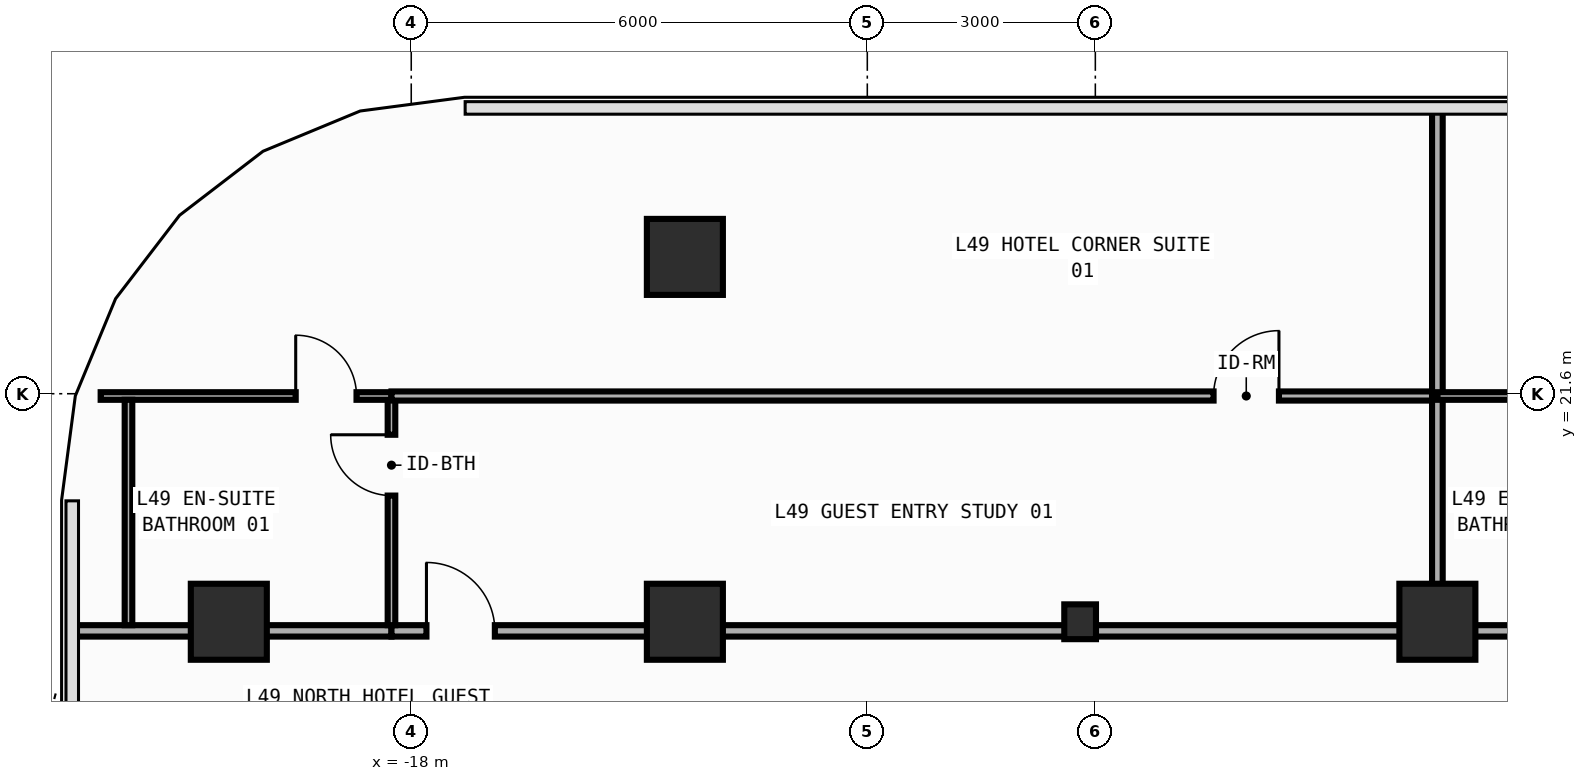
"""IFC4 building model, lengths in metres.
Left out: names, types, materials, properties, quantities, classifications, styles, units other than length and angle.
Written with IfcOpenShell. Run it as: python <this file> out.ifc"""

import sys

from ifc_helpers import new_model, si_unit, direction, frame, frame_2d, origin, origin_2d, place, context, subcontext, project, spatial, rectangle, i_section, extrude, element, fill, save


model = new_model("IFC4")
c1 = context("Model", 3, precision=1e-05, world=origin(), true_north=direction((0.0, 1.0)))
c2 = subcontext(c1, "Body", "Model", "MODEL_VIEW")
j1 = project(units=[si_unit("LENGTHUNIT", "METRE"), si_unit("PLANEANGLEUNIT", "RADIAN")], contexts=[c1])
p1 = place(None, origin())
s1 = spatial("IfcSite", under=j1, at=p1, CompositionType="ELEMENT")
p2 = place(p1, origin())
s2 = spatial("IfcBuilding", under=s1, at=p2, CompositionType="ELEMENT")
p3 = place(p2, frame((0.0, 0.0, 210.6)))
s3 = spatial("IfcBuildingStorey", under=s2, at=p3, CompositionType="ELEMENT", Elevation=210.6)
p4 = place(p3, frame((-9.2, 18.6, 0.0), z_axis=(0.0, 0.0, 1.0), x_axis=(1.0, 0.0, 0.0)))
e1 = element("IfcColumn", 1, at=p4, inside=s3, PredefinedType="COLUMN", context=c2, shape_type="SweptSolid", body=[
    extrude(i_section(OverallWidth=0.417, OverallDepth=0.458, WebThickness=0.03, FlangeThickness=0.05, FilletRadius=0.022, at=origin_2d()), origin(), (0.0, 0.0, 1.0), 3.8),
])
for number, where, z_axis, x_axis in (
    (2, (-20.4, 18.6, 0.0), (0.0, 0.0, 1.0), (1.0, 0.0, 0.0)),
    (3, (-14.4, 18.6, 0.0), (0.0, 0.0, 1.0), (1.0, 0.0, 0.0)),
    (4, (-4.5, 18.6, 0.0), (0.0, 0.0, 1.0), (1.0, 0.0, 0.0)),
    (5, (-14.4, 23.4, 0.0), (0.0, 0.0, 1.0), (1.0, 0.0, 0.0)),
):
    element("IfcColumn", number, at=place(p3, frame(where, z_axis=z_axis, x_axis=x_axis)), inside=s3, PredefinedType="COLUMN", context=c2, shape_type="SweptSolid", body=[
        extrude(rectangle(XDim=1.0, YDim=1.0, at=origin_2d()), origin(), (0.0, 0.0, 1.0), 3.8),
    ])
p5 = place(p3, frame((-22.455, 18.48, 0.0), z_axis=(0.0, 0.0, 1.0), x_axis=(1.0, 0.0, 0.0)))
e6 = element("IfcWall", 6, at=p5, inside=s3, PredefinedType="PARTITIONING", context=c2, shape_type="SweptSolid", body=[
    extrude(rectangle(XDim=4.195, YDim=0.15, at=frame_2d((2.098, 0.0))), origin(), (0.0, 0.0, 1.0), 2.862),
])
p6 = place(p3, frame((-18.26, 18.48, 0.0), z_axis=(0.0, 0.0, 1.0), x_axis=(1.0, 0.0, 0.0)))
e7 = element("IfcWall", 7, at=p6, inside=s3, PredefinedType="PARTITIONING", context=c2, shape_type="SweptSolid", body=[
    extrude(rectangle(XDim=13.76, YDim=0.15, at=frame_2d((6.88, 0.0))), origin(), (0.0, 0.0, 1.0), 2.862),
])
p7 = place(p6, frame((0.46, 0.0, 0.0)))
e8 = element("IfcOpeningElement", 8, at=p7, cuts=e7, PredefinedType="OPENING", context=c2, shape_type="SweptSolid", body=[
    extrude(rectangle(XDim=0.9, YDim=2.15, at=frame_2d((0.45, 1.075))), frame((0.0, 0.085, 0.0), z_axis=(0.0, -1.0, 0.0), x_axis=(1.0, 0.0, 0.0)), (0.0, 0.0, 1.0), 0.17),
])
p8 = place(p3, frame((-4.5, 18.48, 0.0), z_axis=(0.0, 0.0, 1.0), x_axis=(1.0, 0.0, 0.0)))
e9 = element("IfcWall", 9, at=p8, inside=s3, PredefinedType="PARTITIONING", context=c2, shape_type="SweptSolid", body=[
    extrude(rectangle(XDim=3.54, YDim=0.15, at=frame_2d((1.77, 0.0))), origin(), (0.0, 0.0, 1.0), 2.862),
])
p9 = place(p3, frame((-18.26, 18.555, 0.0), z_axis=(0.0, 0.0, 1.0), x_axis=(0.0, 1.0, 0.0)))
e10 = element("IfcWall", 10, at=p9, inside=s3, PredefinedType="PARTITIONING", context=c2, shape_type="SweptSolid", body=[
    extrude(rectangle(XDim=2.965, YDim=0.1, at=frame_2d((1.482, 0.0))), origin(), (0.0, 0.0, 1.0), 3.45),
])
p10 = place(p9, frame((1.705, 0.0, 0.0)))
e11 = element("IfcOpeningElement", 11, at=p10, cuts=e10, PredefinedType="OPENING", context=c2, shape_type="SweptSolid", body=[
    extrude(rectangle(XDim=0.8, YDim=2.1, at=frame_2d((0.4, 1.05))), frame((0.0, 0.06, 0.0), z_axis=(0.0, -1.0, 0.0), x_axis=(1.0, 0.0, 0.0)), (0.0, 0.0, 1.0), 0.12),
])
p11 = place(p3, frame((-22.086, 21.57, 0.0), z_axis=(0.0, 0.0, 1.0), x_axis=(1.0, 0.0, 0.0)))
e12 = element("IfcWall", 12, at=p11, inside=s3, PredefinedType="PARTITIONING", context=c2, shape_type="SweptSolid", body=[
    extrude(rectangle(XDim=3.826, YDim=0.1, at=frame_2d((1.913, 0.0))), origin(), (0.0, 0.0, 1.0), 3.45),
])
p12 = place(p11, frame((2.566, 0.0, 0.0)))
e13 = element("IfcOpeningElement", 13, at=p12, cuts=e12, PredefinedType="OPENING", context=c2, shape_type="SweptSolid", body=[
    extrude(rectangle(XDim=0.8, YDim=2.1, at=frame_2d((0.4, 1.05))), frame((0.0, 0.06, 0.0), z_axis=(0.0, -1.0, 0.0), x_axis=(1.0, 0.0, 0.0)), (0.0, 0.0, 1.0), 0.12),
])
p13 = place(p3, frame((-18.26, 21.57, 0.0), z_axis=(0.0, 0.0, 1.0), x_axis=(1.0, 0.0, 0.0)))
e14 = element("IfcWall", 14, at=p13, inside=s3, PredefinedType="PARTITIONING", context=c2, shape_type="SweptSolid", body=[
    extrude(rectangle(XDim=13.76, YDim=0.12, at=frame_2d((6.88, 0.0))), origin(), (0.0, 0.0, 1.0), 3.45),
])
p14 = place(p13, frame((10.816, 0.0, 0.0)))
e15 = element("IfcOpeningElement", 15, at=p14, cuts=e14, PredefinedType="OPENING", context=c2, shape_type="SweptSolid", body=[
    extrude(rectangle(XDim=0.86, YDim=2.15, at=frame_2d((0.43, 1.075))), frame((0.0, 0.07, 0.0), z_axis=(0.0, -1.0, 0.0), x_axis=(1.0, 0.0, 0.0)), (0.0, 0.0, 1.0), 0.14),
])
p15 = place(p3, frame((-4.5, 18.555, 0.0), z_axis=(0.0, 0.0, 1.0), x_axis=(0.0, 1.0, 0.0)))
e16 = element("IfcWall", 16, at=p15, inside=s3, PredefinedType="PARTITIONING", context=c2, shape_type="SweptSolid", body=[
    extrude(rectangle(XDim=3.015, YDim=0.14, at=frame_2d((1.508, 0.0))), origin(), (0.0, 0.0, 1.0), 3.45),
])
p16 = place(p3, frame((-4.5, 21.57, 0.0), z_axis=(0.0, 0.0, 1.0), x_axis=(0.0, 1.0, 0.0)))
e17 = element("IfcWall", 17, at=p16, inside=s3, PredefinedType="PARTITIONING", context=c2, shape_type="SweptSolid", body=[
    extrude(rectangle(XDim=3.785, YDim=0.14, at=frame_2d((1.893, 0.0))), origin(), (0.0, 0.0, 1.0), 3.45),
])
p17 = place(p3, frame((-4.5, 21.57, 0.0), z_axis=(0.0, 0.0, 1.0), x_axis=(1.0, 0.0, 0.0)))
e18 = element("IfcWall", 18, at=p17, inside=s3, PredefinedType="PARTITIONING", context=c2, shape_type="SweptSolid", body=[
    extrude(rectangle(XDim=3.54, YDim=0.1, at=frame_2d((1.77, 0.0))), origin(), (0.0, 0.0, 1.0), 3.45),
])
p18 = place(p17, frame((1.875, 0.0, 0.0)))
e19 = element("IfcOpeningElement", 19, at=p18, cuts=e18, PredefinedType="OPENING", context=c2, shape_type="SweptSolid", body=[
    extrude(rectangle(XDim=0.8, YDim=2.1, at=frame_2d((0.4, 1.05))), frame((0.0, 0.06, 0.0), z_axis=(0.0, -1.0, 0.0), x_axis=(1.0, 0.0, 0.0)), (0.0, 0.0, 1.0), 0.12),
])
p19 = place(p3, frame((-21.72, 18.555, 0.0), z_axis=(0.0, 0.0, 1.0), x_axis=(0.0, 1.0, 0.0)))
e20 = element("IfcWall", 20, at=p19, inside=s3, PredefinedType="PARTITIONING", context=c2, shape_type="SweptSolid", body=[
    extrude(rectangle(XDim=2.965, YDim=0.1, at=frame_2d((1.482, 0.0))), origin(), (0.0, 0.0, 1.0), 3.45),
])
p20 = place(p7, origin())
e21 = element("IfcDoor", 21, at=p20, inside=s3, OperationType="SINGLE_SWING_LEFT", PredefinedType="DOOR", context=c2, shape_type="SweptSolid", body=[
    extrude(rectangle(XDim=0.9, YDim=2.15, at=frame_2d((0.45, 1.075))), frame((0.0, 0.025, 0.0), z_axis=(0.0, -1.0, 0.0), x_axis=(1.0, 0.0, 0.0)), (0.0, 0.0, 1.0), 0.05),
])
fill(e8, e21)
p21 = place(p10, origin())
e22 = element("IfcDoor", 22, at=p21, inside=s3, OperationType="SINGLE_SWING_RIGHT", PredefinedType="DOOR", context=c2, shape_type="SweptSolid", body=[
    extrude(rectangle(XDim=0.8, YDim=2.1, at=frame_2d((0.4, 1.05))), frame((0.0, 0.025, 0.0), z_axis=(0.0, -1.0, 0.0), x_axis=(1.0, 0.0, 0.0)), (0.0, 0.0, 1.0), 0.05),
])
fill(e11, e22)
p22 = place(p12, origin())
e23 = element("IfcDoor", 23, at=p22, inside=s3, OperationType="SINGLE_SWING_LEFT", PredefinedType="DOOR", context=c2, shape_type="SweptSolid", body=[
    extrude(rectangle(XDim=0.8, YDim=2.1, at=frame_2d((0.4, 1.05))), frame((0.0, 0.025, 0.0), z_axis=(0.0, -1.0, 0.0), x_axis=(1.0, 0.0, 0.0)), (0.0, 0.0, 1.0), 0.05),
])
fill(e13, e23)
p23 = place(p14, origin())
e24 = element("IfcDoor", 24, at=p23, inside=s3, OperationType="SINGLE_SWING_RIGHT", PredefinedType="DOOR", context=c2, shape_type="SweptSolid", body=[
    extrude(rectangle(XDim=0.86, YDim=2.15, at=frame_2d((0.43, 1.075))), frame((0.0, 0.025, 0.0), z_axis=(0.0, -1.0, 0.0), x_axis=(1.0, 0.0, 0.0)), (0.0, 0.0, 1.0), 0.05),
])
fill(e15, e24)
save(model, sys.argv[1])
